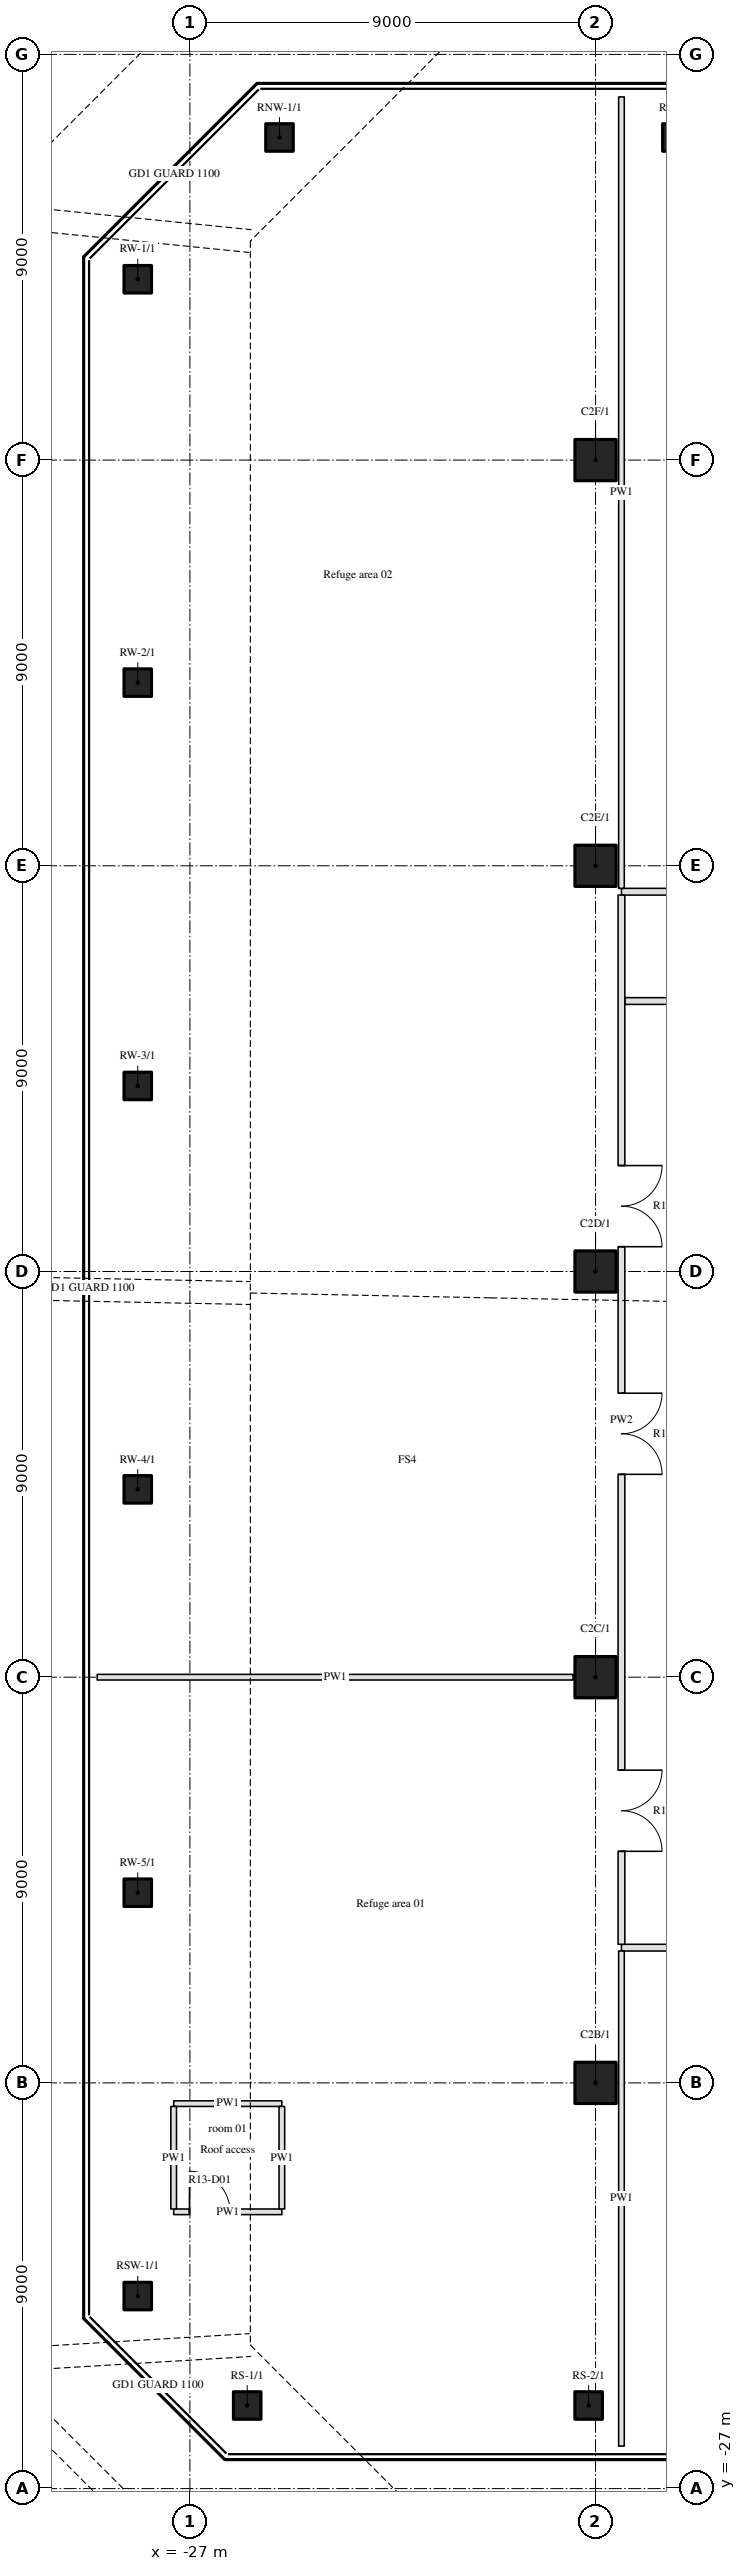
"""IFC4 building model, lengths in metres.
Left out: names, types, materials, properties, quantities, classifications, styles, units other than length and angle.
Written with IfcOpenShell. Run it as: python <this file> out.ifc"""

import sys

from ifc_helpers import new_model, si_unit, direction, frame, frame_2d, origin, origin_2d, place, context, subcontext, project, spatial, rectangle, hollow_circle, extrude, element, fill, save


model = new_model("IFC4")
c1 = context("Model", 3, precision=1e-05, world=origin(), true_north=direction((0.0, 1.0)))
c2 = subcontext(c1, "Body", "Model", "MODEL_VIEW")
j1 = project(units=[si_unit("LENGTHUNIT", "METRE"), si_unit("PLANEANGLEUNIT", "RADIAN")], contexts=[c1])
p1 = place(None, origin())
s1 = spatial("IfcSite", under=j1, at=p1, CompositionType="ELEMENT")
p2 = place(p1, origin())
s2 = spatial("IfcBuilding", under=s1, at=p2, CompositionType="ELEMENT")
p3 = place(p2, frame((0.0, 0.0, 57.6)))
s3 = spatial("IfcBuildingStorey", under=s2, at=p3, CompositionType="ELEMENT", Elevation=57.6)
p4 = place(p3, frame((-18.0, -18.0, 0.0), z_axis=(0.0, 0.0, 1.0), x_axis=(1.0, 0.0, 0.0)))
e1 = element("IfcColumn", 1, at=p4, inside=s3, PredefinedType="COLUMN", context=c2, shape_type="SweptSolid", body=[
    extrude(hollow_circle(Radius=0.457, WallThickness=0.05, at=origin_2d()), origin(), (0.0, 0.0, 1.0), 4.08),
])
for number, where, z_axis, x_axis in (
    (2, (-18.0, -9.0, 0.0), (0.0, 0.0, 1.0), (1.0, 0.0, 0.0)),
    (3, (-18.0, 0.0, 0.0), (0.0, 0.0, 1.0), (1.0, 0.0, 0.0)),
    (4, (-18.0, 9.0, 0.0), (0.0, 0.0, 1.0), (1.0, 0.0, 0.0)),
):
    element("IfcColumn", number, at=place(p3, frame(where, z_axis=z_axis, x_axis=x_axis)), inside=s3, PredefinedType="COLUMN", context=c2, shape_type="SweptSolid", body=[
        extrude(hollow_circle(Radius=0.457, WallThickness=0.05, at=origin_2d()), origin(), (0.0, 0.0, 1.0), 4.5),
    ])
p5 = place(p3, frame((-18.0, 18.0, 0.0), z_axis=(0.0, 0.0, 1.0), x_axis=(1.0, 0.0, 0.0)))
e5 = element("IfcColumn", 5, at=p5, inside=s3, PredefinedType="COLUMN", context=c2, shape_type="SweptSolid", body=[
    extrude(hollow_circle(Radius=0.457, WallThickness=0.05, at=origin_2d()), origin(), (0.0, 0.0, 1.0), 4.08),
])
p6 = place(p3, frame((-25.729, -25.157, 0.0), z_axis=(0.0, 0.0, 1.0), x_axis=(1.0, 0.0, 0.0)))
e6 = element("IfcColumn", 6, at=p6, inside=s3, PredefinedType="COLUMN", context=c2, shape_type="SweptSolid", body=[
    extrude(hollow_circle(Radius=0.305, WallThickness=0.03, at=origin_2d()), origin(), (0.0, 0.0, 1.0), 4.25),
])
for number, where, z_axis, x_axis in (
    (7, (-18.153, -25.157, 0.0), (0.0, 0.0, 1.0), (1.0, 0.0, 0.0)),
    (8, (-16.207, 25.157, 0.0), (0.0, 0.0, 1.0), (1.0, 0.0, 0.0)),
):
    element("IfcColumn", number, at=place(p3, frame(where, z_axis=z_axis, x_axis=x_axis)), inside=s3, PredefinedType="COLUMN", context=c2, shape_type="SweptSolid", body=[
        extrude(hollow_circle(Radius=0.305, WallThickness=0.03, at=origin_2d()), origin(), (0.0, 0.0, 1.0), 4.08),
    ])
for number, where, z_axis, x_axis in (
    (9, (-25.012, 25.157, 0.0), (0.0, 0.0, 1.0), (1.0, 0.0, 0.0)),
    (10, (-28.157, 22.012, 0.0), (0.0, 0.0, 1.0), (1.0, 0.0, 0.0)),
    (11, (-28.157, 13.064, 0.0), (0.0, 0.0, 1.0), (1.0, 0.0, 0.0)),
    (12, (-28.157, 4.116, 0.0), (0.0, 0.0, 1.0), (1.0, 0.0, 0.0)),
    (13, (-28.157, -4.833, 0.0), (0.0, 0.0, 1.0), (1.0, 0.0, 0.0)),
    (14, (-28.157, -13.781, 0.0), (0.0, 0.0, 1.0), (1.0, 0.0, 0.0)),
    (15, (-28.157, -22.729, 0.0), (0.0, 0.0, 1.0), (1.0, 0.0, 0.0)),
):
    element("IfcColumn", number, at=place(p3, frame(where, z_axis=z_axis, x_axis=x_axis)), inside=s3, PredefinedType="COLUMN", context=c2, shape_type="SweptSolid", body=[
        extrude(hollow_circle(Radius=0.305, WallThickness=0.03, at=origin_2d()), origin(), (0.0, 0.0, 1.0), 4.25),
    ])
p7 = place(p3, frame((-27.36, -20.86, 0.0), z_axis=(0.0, 0.0, 1.0), x_axis=(1.0, 0.0, 0.0)))
e16 = element("IfcWall", 16, at=p7, inside=s3, PredefinedType="PARTITIONING", context=c2, shape_type="SweptSolid", body=[
    extrude(rectangle(XDim=2.4, YDim=0.125, at=frame_2d((1.2, 0.0))), origin(), (0.0, 0.0, 1.0), 3.56),
])
p8 = place(p7, frame((0.35, 0.0, 0.0)))
e17 = element("IfcOpeningElement", 17, at=p8, cuts=e16, PredefinedType="OPENING", context=c2, shape_type="SweptSolid", body=[
    extrude(rectangle(XDim=0.9, YDim=2.1, at=frame_2d((0.45, 1.05))), frame((0.0, 0.073, 0.0), z_axis=(0.0, -1.0, 0.0), x_axis=(1.0, 0.0, 0.0)), (0.0, 0.0, 1.0), 0.145),
])
p9 = place(p3, frame((-27.36, -18.46, 0.0), z_axis=(0.0, 0.0, 1.0), x_axis=(1.0, 0.0, 0.0)))
e18 = element("IfcWall", 18, at=p9, inside=s3, PredefinedType="PARTITIONING", context=c2, shape_type="SweptSolid", body=[
    extrude(rectangle(XDim=2.4, YDim=0.125, at=frame_2d((1.2, 0.0))), origin(), (0.0, 0.0, 1.0), 3.56),
])
p10 = place(p3, frame((-17.425, -15.0, 0.0), z_axis=(0.0, 0.0, 1.0), x_axis=(1.0, 0.0, 0.0)))
e19 = element("IfcWall", 19, at=p10, inside=s3, PredefinedType="PARTITIONING", context=c2, shape_type="SweptSolid", body=[
    extrude(rectangle(XDim=34.85, YDim=0.15, at=frame_2d((17.425, 0.0))), origin(), (0.0, 0.0, 1.0), 3.56),
])
p11 = place(p10, frame((16.525, 0.0, 0.0)))
e20 = element("IfcOpeningElement", 20, at=p11, cuts=e19, PredefinedType="OPENING", context=c2, shape_type="SweptSolid", body=[
    extrude(rectangle(XDim=1.8, YDim=2.1, at=frame_2d((0.9, 1.05))), frame((0.0, 0.085, 0.0), z_axis=(0.0, -1.0, 0.0), x_axis=(1.0, 0.0, 0.0)), (0.0, 0.0, 1.0), 0.17),
])
p12 = place(p10, frame((18.625, 0.0, 0.0)))
e21 = element("IfcOpeningElement", 21, at=p12, cuts=e19, PredefinedType="OPENING", context=c2, shape_type="SweptSolid", body=[
    extrude(rectangle(XDim=1.8, YDim=2.1, at=frame_2d((0.9, 1.05))), frame((0.0, 0.085, 0.0), z_axis=(0.0, -1.0, 0.0), x_axis=(1.0, 0.0, 0.0)), (0.0, 0.0, 1.0), 0.17),
])
p13 = place(p3, frame((-29.057, -9.0, 0.0), z_axis=(0.0, 0.0, 1.0), x_axis=(1.0, 0.0, 0.0)))
e22 = element("IfcWall", 22, at=p13, inside=s3, PredefinedType="PARTITIONING", context=c2, shape_type="SweptSolid", body=[
    extrude(rectangle(XDim=10.557, YDim=0.125, at=frame_2d((5.278, 0.0))), origin(), (0.0, 0.0, 1.0), 3.56),
])
p14 = place(p3, frame((-7.35, 6.0, 0.0), z_axis=(0.0, 0.0, 1.0), x_axis=(-1.0, 0.0, 0.0)))
e23 = element("IfcWall", 23, at=p14, inside=s3, PredefinedType="PARTITIONING", context=c2, shape_type="SweptSolid", body=[
    extrude(rectangle(XDim=10.0, YDim=0.15, at=frame_2d((5.0, 0.0))), origin(), (0.0, 0.0, 1.0), 3.56),
])
p15 = place(p14, frame((6.825, 0.0, 0.0)))
e24 = element("IfcOpeningElement", 24, at=p15, cuts=e23, PredefinedType="OPENING", context=c2, shape_type="SweptSolid", body=[
    extrude(rectangle(XDim=1.0, YDim=2.1, at=frame_2d((0.5, 1.05))), frame((0.0, 0.085, 0.0), z_axis=(0.0, -1.0, 0.0), x_axis=(1.0, 0.0, 0.0)), (0.0, 0.0, 1.0), 0.17),
])
p16 = place(p14, frame((1.875, 0.0, 0.0)))
e25 = element("IfcOpeningElement", 25, at=p16, cuts=e23, PredefinedType="OPENING", context=c2, shape_type="SweptSolid", body=[
    extrude(rectangle(XDim=0.9, YDim=2.1, at=frame_2d((0.45, 1.05))), frame((0.0, 0.085, 0.0), z_axis=(0.0, -1.0, 0.0), x_axis=(1.0, 0.0, 0.0)), (0.0, 0.0, 1.0), 0.17),
])
p17 = place(p3, frame((-17.425, 8.425, 0.0), z_axis=(0.0, 0.0, 1.0), x_axis=(1.0, 0.0, 0.0)))
e26 = element("IfcWall", 26, at=p17, inside=s3, PredefinedType="PARTITIONING", context=c2, shape_type="SweptSolid", body=[
    extrude(rectangle(XDim=5.425, YDim=0.15, at=frame_2d((2.712, 0.0))), origin(), (0.0, 0.0, 1.0), 3.56),
])
p18 = place(p17, frame((1.812, 0.0, 0.0)))
e27 = element("IfcOpeningElement", 27, at=p18, cuts=e26, PredefinedType="OPENING", context=c2, shape_type="SweptSolid", body=[
    extrude(rectangle(XDim=1.8, YDim=2.1, at=frame_2d((0.9, 1.05))), frame((0.0, 0.085, 0.0), z_axis=(0.0, -1.0, 0.0), x_axis=(1.0, 0.0, 0.0)), (0.0, 0.0, 1.0), 0.17),
])
for number, where, z_axis, x_axis in (
    (28, (-27.36, -20.798, 0.0), (0.0, 0.0, 1.0), (0.0, 1.0, 0.0)),
    (29, (-24.96, -20.798, 0.0), (0.0, 0.0, 1.0), (0.0, 1.0, 0.0)),
):
    element("IfcWall", number, at=place(p3, frame(where, z_axis=z_axis, x_axis=x_axis)), inside=s3, PredefinedType="PARTITIONING", context=c2, shape_type="SweptSolid", body=[
        extrude(rectangle(XDim=2.275, YDim=0.125, at=frame_2d((1.138, 0.0))), origin(), (0.0, 0.0, 1.0), 3.56),
    ])
p19 = place(p3, frame((-17.425, -26.057, 0.0), z_axis=(0.0, 0.0, 1.0), x_axis=(0.0, 1.0, 0.0)))
e30 = element("IfcWall", 30, at=p19, inside=s3, PredefinedType="PARTITIONING", context=c2, shape_type="SweptSolid", body=[
    extrude(rectangle(XDim=10.982, YDim=0.125, at=frame_2d((5.491, 0.0))), origin(), (0.0, 0.0, 1.0), 3.56),
])
p20 = place(p3, frame((-17.425, 8.35, 0.0), z_axis=(0.0, 0.0, 1.0), x_axis=(0.0, -1.0, 0.0)))
e31 = element("IfcWall", 31, at=p20, inside=s3, PredefinedType="PARTITIONING", context=c2, shape_type="SweptSolid", body=[
    extrude(rectangle(XDim=23.275, YDim=0.15, at=frame_2d((11.638, 0.0))), origin(), (0.0, 0.0, 1.0), 3.56),
])
p21 = place(p20, frame((19.413, 0.0, 0.0)))
e32 = element("IfcOpeningElement", 32, at=p21, cuts=e31, PredefinedType="OPENING", context=c2, shape_type="SweptSolid", body=[
    extrude(rectangle(XDim=1.8, YDim=2.1, at=frame_2d((0.9, 1.05))), frame((0.0, 0.085, 0.0), z_axis=(0.0, -1.0, 0.0), x_axis=(1.0, 0.0, 0.0)), (0.0, 0.0, 1.0), 0.17),
])
p22 = place(p20, frame((11.05, 0.0, 0.0)))
e33 = element("IfcOpeningElement", 33, at=p22, cuts=e31, PredefinedType="OPENING", context=c2, shape_type="SweptSolid", body=[
    extrude(rectangle(XDim=1.8, YDim=2.1, at=frame_2d((0.9, 1.05))), frame((0.0, 0.085, 0.0), z_axis=(0.0, -1.0, 0.0), x_axis=(1.0, 0.0, 0.0)), (0.0, 0.0, 1.0), 0.17),
])
p23 = place(p20, frame((6.0, 0.0, 0.0)))
e34 = element("IfcOpeningElement", 34, at=p23, cuts=e31, PredefinedType="OPENING", context=c2, shape_type="SweptSolid", body=[
    extrude(rectangle(XDim=1.8, YDim=2.1, at=frame_2d((0.9, 1.05))), frame((0.0, 0.085, 0.0), z_axis=(0.0, -1.0, 0.0), x_axis=(1.0, 0.0, 0.0)), (0.0, 0.0, 1.0), 0.17),
])
p24 = place(p3, frame((-17.425, 8.5, 0.0), z_axis=(0.0, 0.0, 1.0), x_axis=(0.0, 1.0, 0.0)))
e35 = element("IfcWall", 35, at=p24, inside=s3, PredefinedType="PARTITIONING", context=c2, shape_type="SweptSolid", body=[
    extrude(rectangle(XDim=17.557, YDim=0.125, at=frame_2d((8.778, 0.0))), origin(), (0.0, 0.0, 1.0), 3.56),
])
p25 = place(p21, origin())
e36 = element("IfcDoor", 36, at=p25, inside=s3, OperationType="DOUBLE_DOOR_SINGLE_SWING", PredefinedType="DOOR", context=c2, shape_type="SweptSolid", body=[
    extrude(rectangle(XDim=1.8, YDim=2.1, at=frame_2d((0.9, 1.05))), frame((0.0, 0.025, 0.0), z_axis=(0.0, -1.0, 0.0), x_axis=(1.0, 0.0, 0.0)), (0.0, 0.0, 1.0), 0.05),
])
fill(e32, e36)
p26 = place(p22, origin())
e37 = element("IfcDoor", 37, at=p26, inside=s3, OperationType="DOUBLE_DOOR_SINGLE_SWING", PredefinedType="DOOR", context=c2, shape_type="SweptSolid", body=[
    extrude(rectangle(XDim=1.8, YDim=2.1, at=frame_2d((0.9, 1.05))), frame((0.0, 0.025, 0.0), z_axis=(0.0, -1.0, 0.0), x_axis=(1.0, 0.0, 0.0)), (0.0, 0.0, 1.0), 0.05),
])
fill(e33, e37)
p27 = place(p23, origin())
e38 = element("IfcDoor", 38, at=p27, inside=s3, OperationType="DOUBLE_DOOR_SINGLE_SWING", PredefinedType="DOOR", context=c2, shape_type="SweptSolid", body=[
    extrude(rectangle(XDim=1.8, YDim=2.1, at=frame_2d((0.9, 1.05))), frame((0.0, 0.025, 0.0), z_axis=(0.0, -1.0, 0.0), x_axis=(1.0, 0.0, 0.0)), (0.0, 0.0, 1.0), 0.05),
])
fill(e34, e38)
p28 = place(p8, origin())
e39 = element("IfcDoor", 39, at=p28, inside=s3, OperationType="SINGLE_SWING_LEFT", PredefinedType="DOOR", context=c2, shape_type="SweptSolid", body=[
    extrude(rectangle(XDim=0.9, YDim=2.1, at=frame_2d((0.45, 1.05))), frame((0.0, 0.025, 0.0), z_axis=(0.0, -1.0, 0.0), x_axis=(1.0, 0.0, 0.0)), (0.0, 0.0, 1.0), 0.05),
])
fill(e17, e39)
save(model, sys.argv[1])
